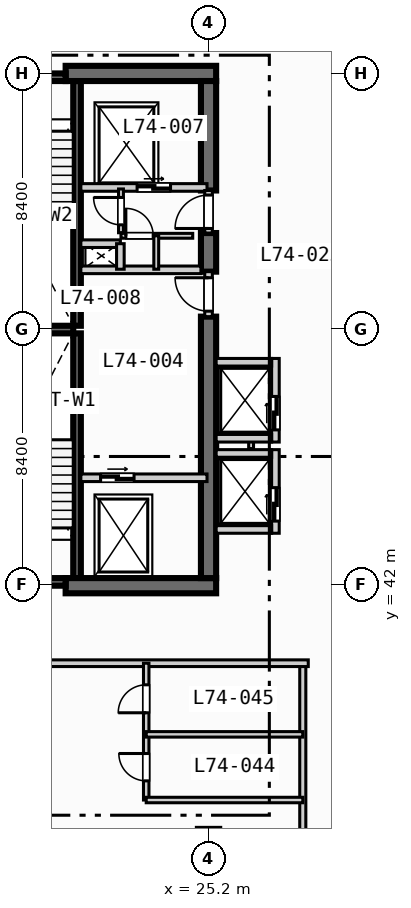
"""IFC4 building model, lengths in metres.
Left out: names, types, materials, properties, quantities, classifications, styles, units other than length and angle.
Written with IfcOpenShell. Run it as: python <this file> out.ifc"""

import sys

from ifc_helpers import new_model, si_unit, direction, frame, frame_2d, origin, place, context, subcontext, project, spatial, rectangle, extrude, element, fill, save


model = new_model("IFC4")
c1 = context("Model", 3, precision=1e-05, world=origin(), true_north=direction((0.0, 1.0)))
c2 = subcontext(c1, "Body", "Model", "MODEL_VIEW")
j1 = project(units=[si_unit("LENGTHUNIT", "METRE"), si_unit("PLANEANGLEUNIT", "RADIAN")], contexts=[c1])
p1 = place(None, origin())
s1 = spatial("IfcSite", under=j1, at=p1, CompositionType="ELEMENT")
p2 = place(p1, origin())
s2 = spatial("IfcBuilding", under=s1, at=p2, CompositionType="ELEMENT")
p3 = place(p2, frame((0.0, 0.0, 300.8)))
s3 = spatial("IfcBuildingStorey", under=s2, at=p3, CompositionType="ELEMENT", Elevation=300.8)
for number, where, z_axis, x_axis in (
    (1, (20.875, 42.2, 0.0), (0.0, 0.0, 1.0), (0.0, 1.0, 0.0)),
    (2, (20.875, 50.5, 0.0), (0.0, 0.0, 1.0), (0.0, 1.0, 0.0)),
):
    element("IfcWall", number, at=place(p3, frame(where, z_axis=z_axis, x_axis=x_axis)), inside=s3, PredefinedType="SOLIDWALL", context=c2, shape_type="SweptSolid", body=[
        extrude(rectangle(XDim=8.05, YDim=0.25, at=frame_2d((4.025, 0.0))), origin(), (0.0, 0.0, 1.0), 3.67),
    ])
p4 = place(p3, frame((17.25, 50.375, 0.0), z_axis=(0.0, 0.0, 1.0), x_axis=(1.0, 0.0, 0.0)))
e3 = element("IfcWall", 3, at=p4, inside=s3, PredefinedType="SOLIDWALL", context=c2, shape_type="SweptSolid", body=[
    extrude(rectangle(XDim=3.5, YDim=0.25, at=frame_2d((1.75, 0.0))), origin(), (0.0, 0.0, 1.0), 3.67),
])
for number, where, z_axis, x_axis in (
    (4, (20.5, 41.95, 0.0), (0.0, 0.0, 1.0), (1.0, 0.0, 0.0)),
    (5, (20.5, 58.8, 0.0), (0.0, 0.0, 1.0), (1.0, 0.0, 0.0)),
):
    element("IfcWall", number, at=place(p3, frame(where, z_axis=z_axis, x_axis=x_axis)), inside=s3, PredefinedType="SHEAR", context=c2, shape_type="SweptSolid", body=[
        extrude(rectangle(XDim=4.95, YDim=0.5, at=frame_2d((2.475, 0.0))), origin(), (0.0, 0.0, 1.0), 3.67),
    ])
p5 = place(p3, frame((25.2, 42.2, 0.0), z_axis=(0.0, 0.0, 1.0), x_axis=(0.0, 1.0, 0.0)))
e6 = element("IfcWall", 6, at=p5, inside=s3, PredefinedType="SHEAR", context=c2, shape_type="SweptSolid", body=[
    extrude(rectangle(XDim=8.6, YDim=0.5, at=frame_2d((4.3, 0.0))), origin(), (0.0, 0.0, 1.0), 3.67),
])
p6 = place(p3, frame((25.2, 52.28, 0.0), z_axis=(0.0, 0.0, 1.0), x_axis=(0.0, 1.0, 0.0)))
e7 = element("IfcWall", 7, at=p6, inside=s3, PredefinedType="SHEAR", context=c2, shape_type="SweptSolid", body=[
    extrude(rectangle(XDim=1.27, YDim=0.5, at=frame_2d((0.635, 0.0))), origin(), (0.0, 0.0, 1.0), 3.67),
])
p7 = place(p3, frame((25.2, 54.95, 0.0), z_axis=(0.0, 0.0, 1.0), x_axis=(0.0, 1.0, 0.0)))
e8 = element("IfcWall", 8, at=p7, inside=s3, PredefinedType="SHEAR", context=c2, shape_type="SweptSolid", body=[
    extrude(rectangle(XDim=3.6, YDim=0.5, at=frame_2d((1.8, 0.0))), origin(), (0.0, 0.0, 1.0), 3.67),
])
p8 = place(p3, frame((18.0, 42.075, 0.0), z_axis=(0.0, 0.0, 1.0), x_axis=(1.0, 0.0, 0.0)))
e9 = element("IfcWall", 9, at=p8, inside=s3, PredefinedType="SOLIDWALL", context=c2, shape_type="SweptSolid", body=[
    extrude(rectangle(XDim=2.5, YDim=0.25, at=frame_2d((1.25, 0.0))), origin(), (0.0, 0.0, 1.0), 3.67),
])
p9 = place(p8, frame((0.7, 0.0, 0.0)))
e10 = element("IfcOpeningElement", 10, at=p9, cuts=e9, PredefinedType="OPENING", context=c2, shape_type="SweptSolid", body=[
    extrude(rectangle(XDim=1.1, YDim=2.15, at=frame_2d((0.55, 1.075))), frame((0.0, 0.135, 0.0), z_axis=(0.0, -1.0, 0.0), x_axis=(1.0, 0.0, 0.0)), (0.0, 0.0, 1.0), 0.27),
])
p10 = place(p3, frame((18.0, 58.675, 0.0), z_axis=(0.0, 0.0, 1.0), x_axis=(1.0, 0.0, 0.0)))
e11 = element("IfcWall", 11, at=p10, inside=s3, PredefinedType="SOLIDWALL", context=c2, shape_type="SweptSolid", body=[
    extrude(rectangle(XDim=2.5, YDim=0.25, at=frame_2d((1.25, 0.0))), origin(), (0.0, 0.0, 1.0), 3.67),
])
p11 = place(p10, frame((0.7, 0.0, 0.0)))
e12 = element("IfcOpeningElement", 12, at=p11, cuts=e11, PredefinedType="OPENING", context=c2, shape_type="SweptSolid", body=[
    extrude(rectangle(XDim=1.1, YDim=2.15, at=frame_2d((0.55, 1.075))), frame((0.0, 0.135, 0.0), z_axis=(0.0, -1.0, 0.0), x_axis=(1.0, 0.0, 0.0)), (0.0, 0.0, 1.0), 0.27),
])
p12 = place(p3, frame((21.0, 45.5, 0.0), z_axis=(0.0, 0.0, 1.0), x_axis=(1.0, 0.0, 0.0)))
e13 = element("IfcWall", 13, at=p12, inside=s3, PredefinedType="SOLIDWALL", context=c2, shape_type="SweptSolid", body=[
    extrude(rectangle(XDim=4.15, YDim=0.25, at=frame_2d((2.075, 0.0))), origin(), (0.0, 0.0, 1.0), 3.67),
])
p13 = place(p12, frame((0.65, 0.0, 0.0)))
e14 = element("IfcOpeningElement", 14, at=p13, cuts=e13, PredefinedType="OPENING", context=c2, shape_type="SweptSolid", body=[
    extrude(rectangle(XDim=1.1, YDim=2.15, at=frame_2d((0.55, 1.075))), frame((0.0, 0.135, 0.0), z_axis=(0.0, -1.0, 0.0), x_axis=(1.0, 0.0, 0.0)), (0.0, 0.0, 1.0), 0.27),
])
p14 = place(p3, frame((25.2, 50.8, 0.0), z_axis=(0.0, 0.0, 1.0), x_axis=(0.0, 1.0, 0.0)))
e15 = element("IfcWall", 15, at=p14, inside=s3, PredefinedType="SOLIDWALL", context=c2, shape_type="SweptSolid", body=[
    extrude(rectangle(XDim=1.48, YDim=0.25, at=frame_2d((0.74, 0.0))), origin(), (0.0, 0.0, 1.0), 3.67),
])
p15 = place(p14, frame((0.18, 0.0, 0.0)))
e16 = element("IfcOpeningElement", 16, at=p15, cuts=e15, PredefinedType="OPENING", context=c2, shape_type="SweptSolid", body=[
    extrude(rectangle(XDim=1.1, YDim=2.15, at=frame_2d((0.55, 1.075))), frame((0.0, 0.135, 0.0), z_axis=(0.0, -1.0, 0.0), x_axis=(1.0, 0.0, 0.0)), (0.0, 0.0, 1.0), 0.27),
])
p16 = place(p3, frame((21.0, 52.34, 0.0), z_axis=(0.0, 0.0, 1.0), x_axis=(1.0, 0.0, 0.0)))
e17 = element("IfcWall", 17, at=p16, inside=s3, PredefinedType="SOLIDWALL", context=c2, shape_type="SweptSolid", body=[
    extrude(rectangle(XDim=3.95, YDim=0.25, at=frame_2d((1.975, 0.0))), origin(), (0.0, 0.0, 1.0), 3.67),
])
p17 = place(p3, frame((21.0, 55.05, 0.0), z_axis=(0.0, 0.0, 1.0), x_axis=(1.0, 0.0, 0.0)))
e18 = element("IfcWall", 18, at=p17, inside=s3, PredefinedType="SOLIDWALL", context=c2, shape_type="SweptSolid", body=[
    extrude(rectangle(XDim=4.15, YDim=0.25, at=frame_2d((2.075, 0.0))), origin(), (0.0, 0.0, 1.0), 3.67),
])
p18 = place(p17, frame((1.85, 0.0, 0.0)))
e19 = element("IfcOpeningElement", 19, at=p18, cuts=e18, PredefinedType="OPENING", context=c2, shape_type="SweptSolid", body=[
    extrude(rectangle(XDim=1.1, YDim=2.15, at=frame_2d((0.55, 1.075))), frame((0.0, 0.135, 0.0), z_axis=(0.0, -1.0, 0.0), x_axis=(1.0, 0.0, 0.0)), (0.0, 0.0, 1.0), 0.27),
])
p19 = place(p3, frame((25.2, 53.55, 0.0), z_axis=(0.0, 0.0, 1.0), x_axis=(0.0, 1.0, 0.0)))
e20 = element("IfcWall", 20, at=p19, inside=s3, PredefinedType="SOLIDWALL", context=c2, shape_type="SweptSolid", body=[
    extrude(rectangle(XDim=1.4, YDim=0.25, at=frame_2d((0.7, 0.0))), origin(), (0.0, 0.0, 1.0), 3.67),
])
p20 = place(p19, frame((0.15, 0.0, 0.0)))
e21 = element("IfcOpeningElement", 21, at=p20, cuts=e20, PredefinedType="OPENING", context=c2, shape_type="SweptSolid", body=[
    extrude(rectangle(XDim=1.1, YDim=2.15, at=frame_2d((0.55, 1.075))), frame((0.0, 0.135, 0.0), z_axis=(0.0, -1.0, 0.0), x_axis=(1.0, 0.0, 0.0)), (0.0, 0.0, 1.0), 0.27),
])
p21 = place(p3, frame((21.0, 53.2, 0.0), z_axis=(0.0, 0.0, 1.0), x_axis=(1.0, 0.0, 0.0)))
e22 = element("IfcWall", 22, at=p21, inside=s3, PredefinedType="SOLIDWALL", context=c2, shape_type="SweptSolid", body=[
    extrude(rectangle(XDim=1.3, YDim=0.25, at=frame_2d((0.65, 0.0))), origin(), (0.0, 0.0, 1.0), 3.67),
])
p22 = place(p3, frame((22.3, 52.36, 0.0), z_axis=(0.0, 0.0, 1.0), x_axis=(0.0, 1.0, 0.0)))
e23 = element("IfcWall", 23, at=p22, inside=s3, PredefinedType="SOLIDWALL", context=c2, shape_type="SweptSolid", body=[
    extrude(rectangle(XDim=0.84, YDim=0.25, at=frame_2d((0.42, 0.0))), origin(), (0.0, 0.0, 1.0), 3.67),
])
p23 = place(p3, frame((22.32, 53.56, 0.0), z_axis=(0.0, 0.0, 1.0), x_axis=(0.0, 1.0, 0.0)))
e24 = element("IfcWall", 24, at=p23, inside=s3, PredefinedType="PARTITIONING", context=c2, shape_type="SweptSolid", body=[
    extrude(rectangle(XDim=1.44, YDim=0.16, at=frame_2d((0.72, 0.0))), origin(), (0.0, 0.0, 1.0), 3.67),
])
p24 = place(p23, frame((0.26, 0.0, 0.0)))
e25 = element("IfcOpeningElement", 25, at=p24, cuts=e24, PredefinedType="OPENING", context=c2, shape_type="SweptSolid", body=[
    extrude(rectangle(XDim=0.9, YDim=2.1, at=frame_2d((0.45, 1.05))), frame((0.0, 0.09, 0.0), z_axis=(0.0, -1.0, 0.0), x_axis=(1.0, 0.0, 0.0)), (0.0, 0.0, 1.0), 0.18),
])
p25 = place(p3, frame((22.32, 53.46, 0.0), z_axis=(0.0, 0.0, 1.0), x_axis=(1.0, 0.0, 0.0)))
e26 = element("IfcWall", 26, at=p25, inside=s3, PredefinedType="PARTITIONING", context=c2, shape_type="SweptSolid", body=[
    extrude(rectangle(XDim=2.36, YDim=0.16, at=frame_2d((1.18, 0.0))), origin(), (0.0, 0.0, 1.0), 3.67),
])
p26 = place(p25, frame((0.16, 0.0, 0.0)))
e27 = element("IfcOpeningElement", 27, at=p26, cuts=e26, PredefinedType="OPENING", context=c2, shape_type="SweptSolid", body=[
    extrude(rectangle(XDim=0.9, YDim=2.1, at=frame_2d((0.45, 1.05))), frame((0.0, 0.09, 0.0), z_axis=(0.0, -1.0, 0.0), x_axis=(1.0, 0.0, 0.0)), (0.0, 0.0, 1.0), 0.18),
])
p27 = place(p3, frame((23.48, 52.36, 0.0), z_axis=(0.0, 0.0, 1.0), x_axis=(0.0, 1.0, 0.0)))
e28 = element("IfcWall", 28, at=p27, inside=s3, PredefinedType="PARTITIONING", context=c2, shape_type="SweptSolid", body=[
    extrude(rectangle(XDim=1.1, YDim=0.16, at=frame_2d((0.55, 0.0))), origin(), (0.0, 0.0, 1.0), 3.67),
])
p28 = place(p3, frame((27.4, 43.675, 0.0), z_axis=(0.0, 0.0, 1.0), x_axis=(0.0, 1.0, 0.0)))
e29 = element("IfcWall", 29, at=p28, inside=s3, PredefinedType="SOLIDWALL", context=c2, shape_type="SweptSolid", body=[
    extrude(rectangle(XDim=2.75, YDim=0.25, at=frame_2d((1.375, 0.0))), origin(), (0.0, 0.0, 1.0), 3.67),
])
p29 = place(p28, frame((0.4, 0.0, 0.0)))
e30 = element("IfcOpeningElement", 30, at=p29, cuts=e29, PredefinedType="OPENING", context=c2, shape_type="SweptSolid", body=[
    extrude(rectangle(XDim=1.1, YDim=2.15, at=frame_2d((0.55, 1.075))), frame((0.0, 0.135, 0.0), z_axis=(0.0, -1.0, 0.0), x_axis=(1.0, 0.0, 0.0)), (0.0, 0.0, 1.0), 0.27),
])
for number, where, z_axis, x_axis in (
    (31, (25.45, 43.8, 0.0), (0.0, 0.0, 1.0), (1.0, 0.0, 0.0)),
    (32, (25.45, 46.3, 0.0), (0.0, 0.0, 1.0), (1.0, 0.0, 0.0)),
):
    element("IfcWall", number, at=place(p3, frame(where, z_axis=z_axis, x_axis=x_axis)), inside=s3, PredefinedType="SOLIDWALL", context=c2, shape_type="SweptSolid", body=[
        extrude(rectangle(XDim=1.825, YDim=0.25, at=frame_2d((0.913, 0.0))), origin(), (0.0, 0.0, 1.0), 3.67),
    ])
p30 = place(p3, frame((26.6, 46.46, 0.0), z_axis=(0.0, 0.0, 1.0), x_axis=(0.0, 1.0, 0.0)))
e33 = element("IfcWall", 33, at=p30, inside=s3, PredefinedType="PARTITIONING", context=c2, shape_type="SweptSolid", body=[
    extrude(rectangle(XDim=0.88, YDim=0.16, at=frame_2d((0.44, 0.0))), origin(), (0.0, 0.0, 1.0), 3.67),
])
p31 = place(p3, frame((27.4, 46.675, 0.0), z_axis=(0.0, 0.0, 1.0), x_axis=(0.0, 1.0, 0.0)))
e34 = element("IfcWall", 34, at=p31, inside=s3, PredefinedType="SOLIDWALL", context=c2, shape_type="SweptSolid", body=[
    extrude(rectangle(XDim=2.75, YDim=0.25, at=frame_2d((1.375, 0.0))), origin(), (0.0, 0.0, 1.0), 3.67),
])
p32 = place(p31, frame((0.4, 0.0, 0.0)))
e35 = element("IfcOpeningElement", 35, at=p32, cuts=e34, PredefinedType="OPENING", context=c2, shape_type="SweptSolid", body=[
    extrude(rectangle(XDim=1.1, YDim=2.15, at=frame_2d((0.55, 1.075))), frame((0.0, 0.135, 0.0), z_axis=(0.0, -1.0, 0.0), x_axis=(1.0, 0.0, 0.0)), (0.0, 0.0, 1.0), 0.27),
])
for number, where, z_axis, x_axis in (
    (36, (25.45, 46.8, 0.0), (0.0, 0.0, 1.0), (1.0, 0.0, 0.0)),
    (37, (25.45, 49.3, 0.0), (0.0, 0.0, 1.0), (1.0, 0.0, 0.0)),
):
    element("IfcWall", number, at=place(p3, frame(where, z_axis=z_axis, x_axis=x_axis)), inside=s3, PredefinedType="SOLIDWALL", context=c2, shape_type="SweptSolid", body=[
        extrude(rectangle(XDim=1.825, YDim=0.25, at=frame_2d((0.913, 0.0))), origin(), (0.0, 0.0, 1.0), 3.67),
    ])
p33 = place(p3, frame((28.3, 30.65, 0.0), z_axis=(0.0, 0.0, 1.0), x_axis=(0.0, 1.0, 0.0)))
e38 = element("IfcWall", 38, at=p33, inside=s3, PredefinedType="PARTITIONING", context=c2, shape_type="SweptSolid", body=[
    extrude(rectangle(XDim=8.75, YDim=0.2, at=frame_2d((4.375, 0.0))), origin(), (0.0, 0.0, 1.0), 3.67),
])
p34 = place(p33, frame((1.645, 0.0, 0.0)))
e39 = element("IfcOpeningElement", 39, at=p34, cuts=e38, PredefinedType="OPENING", context=c2, shape_type="SweptSolid", body=[
    extrude(rectangle(XDim=1.0, YDim=2.15, at=frame_2d((0.5, 1.075))), frame((0.0, 0.11, 0.0), z_axis=(0.0, -1.0, 0.0), x_axis=(1.0, 0.0, 0.0)), (0.0, 0.0, 1.0), 0.22),
])
p35 = place(p3, frame((8.6, 39.4, 0.0), z_axis=(0.0, 0.0, 1.0), x_axis=(1.0, 0.0, 0.0)))
e40 = element("IfcWall", 40, at=p35, inside=s3, PredefinedType="PARTITIONING", context=c2, shape_type="SweptSolid", body=[
    extrude(rectangle(XDim=19.88, YDim=0.22, at=frame_2d((9.94, 0.0))), origin(), (0.0, 0.0, 1.0), 3.67),
])
p36 = place(p3, frame((23.15, 34.9, 0.0), z_axis=(0.0, 0.0, 1.0), x_axis=(0.0, 1.0, 0.0)))
e41 = element("IfcWall", 41, at=p36, inside=s3, PredefinedType="PLUMBINGWALL", context=c2, shape_type="SweptSolid", body=[
    extrude(rectangle(XDim=4.5, YDim=0.18, at=frame_2d((2.25, 0.0))), origin(), (0.0, 0.0, 1.0), 3.67),
])
p37 = place(p36, frame((0.63, 0.0, 0.0)))
e42 = element("IfcOpeningElement", 42, at=p37, cuts=e41, PredefinedType="OPENING", context=c2, shape_type="SweptSolid", body=[
    extrude(rectangle(XDim=0.9, YDim=2.1, at=frame_2d((0.45, 1.05))), frame((0.0, 0.1, 0.0), z_axis=(0.0, -1.0, 0.0), x_axis=(1.0, 0.0, 0.0)), (0.0, 0.0, 1.0), 0.2),
])
p38 = place(p36, frame((2.87, 0.0, 0.0)))
e43 = element("IfcOpeningElement", 43, at=p38, cuts=e41, PredefinedType="OPENING", context=c2, shape_type="SweptSolid", body=[
    extrude(rectangle(XDim=0.92, YDim=2.1, at=frame_2d((0.46, 1.05))), frame((0.0, 0.1, 0.0), z_axis=(0.0, -1.0, 0.0), x_axis=(1.0, 0.0, 0.0)), (0.0, 0.0, 1.0), 0.2),
])
for number, where, z_axis, x_axis in (
    (44, (23.15, 34.9, 0.0), (0.0, 0.0, 1.0), (1.0, 0.0, 0.0)),
    (45, (23.15, 37.06, 0.0), (0.0, 0.0, 1.0), (1.0, 0.0, 0.0)),
):
    element("IfcWall", number, at=place(p3, frame(where, z_axis=z_axis, x_axis=x_axis)), inside=s3, PredefinedType="PLUMBINGWALL", context=c2, shape_type="SweptSolid", body=[
        extrude(rectangle(XDim=5.15, YDim=0.18, at=frame_2d((2.575, 0.0))), origin(), (0.0, 0.0, 1.0), 3.67),
    ])
p39 = place(p13, origin())
e46 = element("IfcDoor", 46, at=p39, inside=s3, OperationType="SLIDING_TO_LEFT", PredefinedType="DOOR", context=c2, shape_type="SweptSolid", body=[
    extrude(rectangle(XDim=1.1, YDim=2.15, at=frame_2d((0.55, 1.075))), frame((0.0, 0.025, 0.0), z_axis=(0.0, -1.0, 0.0), x_axis=(1.0, 0.0, 0.0)), (0.0, 0.0, 1.0), 0.05),
])
fill(e14, e46)
p40 = place(p15, origin())
e47 = element("IfcDoor", 47, at=p40, inside=s3, OperationType="SINGLE_SWING_RIGHT", PredefinedType="DOOR", context=c2, shape_type="SweptSolid", body=[
    extrude(rectangle(XDim=1.1, YDim=2.15, at=frame_2d((0.55, 1.075))), frame((0.0, 0.025, 0.0), z_axis=(0.0, -1.0, 0.0), x_axis=(1.0, 0.0, 0.0)), (0.0, 0.0, 1.0), 0.05),
])
fill(e16, e47)
p41 = place(p18, origin())
e48 = element("IfcDoor", 48, at=p41, inside=s3, OperationType="SLIDING_TO_LEFT", PredefinedType="DOOR", context=c2, shape_type="SweptSolid", body=[
    extrude(rectangle(XDim=1.1, YDim=2.15, at=frame_2d((0.55, 1.075))), frame((0.0, 0.025, 0.0), z_axis=(0.0, -1.0, 0.0), x_axis=(1.0, 0.0, 0.0)), (0.0, 0.0, 1.0), 0.05),
])
fill(e19, e48)
p42 = place(p20, origin())
e49 = element("IfcDoor", 49, at=p42, inside=s3, OperationType="SINGLE_SWING_LEFT", PredefinedType="DOOR", context=c2, shape_type="SweptSolid", body=[
    extrude(rectangle(XDim=1.1, YDim=2.15, at=frame_2d((0.55, 1.075))), frame((0.0, 0.025, 0.0), z_axis=(0.0, -1.0, 0.0), x_axis=(1.0, 0.0, 0.0)), (0.0, 0.0, 1.0), 0.05),
])
fill(e21, e49)
p43 = place(p24, origin())
e50 = element("IfcDoor", 50, at=p43, inside=s3, OperationType="SINGLE_SWING_RIGHT", PredefinedType="DOOR", context=c2, shape_type="SweptSolid", body=[
    extrude(rectangle(XDim=0.9, YDim=2.1, at=frame_2d((0.45, 1.05))), frame((0.0, 0.025, 0.0), z_axis=(0.0, -1.0, 0.0), x_axis=(1.0, 0.0, 0.0)), (0.0, 0.0, 1.0), 0.05),
])
fill(e25, e50)
p44 = place(p26, origin())
e51 = element("IfcDoor", 51, at=p44, inside=s3, OperationType="SINGLE_SWING_LEFT", PredefinedType="DOOR", context=c2, shape_type="SweptSolid", body=[
    extrude(rectangle(XDim=0.9, YDim=2.1, at=frame_2d((0.45, 1.05))), frame((0.0, 0.025, 0.0), z_axis=(0.0, -1.0, 0.0), x_axis=(1.0, 0.0, 0.0)), (0.0, 0.0, 1.0), 0.05),
])
fill(e27, e51)
p45 = place(p29, origin())
e52 = element("IfcDoor", 52, at=p45, inside=s3, OperationType="SLIDING_TO_LEFT", PredefinedType="DOOR", context=c2, shape_type="SweptSolid", body=[
    extrude(rectangle(XDim=1.1, YDim=2.15, at=frame_2d((0.55, 1.075))), frame((0.0, 0.025, 0.0), z_axis=(0.0, -1.0, 0.0), x_axis=(1.0, 0.0, 0.0)), (0.0, 0.0, 1.0), 0.05),
])
fill(e30, e52)
p46 = place(p32, origin())
e53 = element("IfcDoor", 53, at=p46, inside=s3, OperationType="SLIDING_TO_LEFT", PredefinedType="DOOR", context=c2, shape_type="SweptSolid", body=[
    extrude(rectangle(XDim=1.1, YDim=2.15, at=frame_2d((0.55, 1.075))), frame((0.0, 0.025, 0.0), z_axis=(0.0, -1.0, 0.0), x_axis=(1.0, 0.0, 0.0)), (0.0, 0.0, 1.0), 0.05),
])
fill(e35, e53)
p47 = place(p37, origin())
e54 = element("IfcDoor", 54, at=p47, inside=s3, OperationType="SINGLE_SWING_RIGHT", PredefinedType="DOOR", context=c2, shape_type="SweptSolid", body=[
    extrude(rectangle(XDim=0.9, YDim=2.1, at=frame_2d((0.45, 1.05))), frame((0.0, 0.025, 0.0), z_axis=(0.0, -1.0, 0.0), x_axis=(1.0, 0.0, 0.0)), (0.0, 0.0, 1.0), 0.05),
])
fill(e42, e54)
p48 = place(p38, origin())
e55 = element("IfcDoor", 55, at=p48, inside=s3, OperationType="SINGLE_SWING_LEFT", PredefinedType="DOOR", context=c2, shape_type="SweptSolid", body=[
    extrude(rectangle(XDim=0.92, YDim=2.1, at=frame_2d((0.46, 1.05))), frame((0.0, 0.025, 0.0), z_axis=(0.0, -1.0, 0.0), x_axis=(1.0, 0.0, 0.0)), (0.0, 0.0, 1.0), 0.05),
])
fill(e43, e55)
save(model, sys.argv[1])
